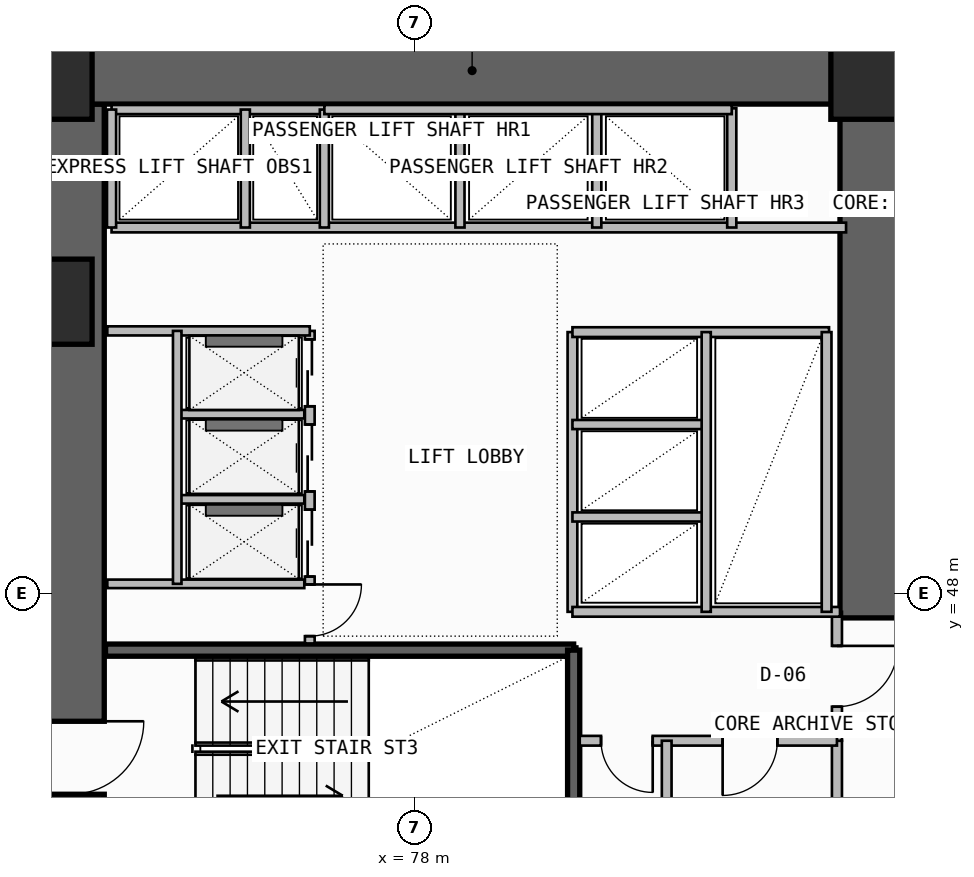
"""IFC4 building model, lengths in metres.
Left out: names, types, materials, properties, quantities, classifications, styles, units other than length and angle.
Written with IfcOpenShell. Run it as: python <this file> out.ifc"""

import sys

from ifc_helpers import new_model, si_unit, direction, frame, frame_2d, origin, origin_2d, place, context, subcontext, project, spatial, rectangle, extrude, element, fill, save


model = new_model("IFC4")
c1 = context("Model", 3, precision=1e-05, world=origin(), true_north=direction((0.0, 1.0)))
c2 = subcontext(c1, "Body", "Model", "MODEL_VIEW")
j1 = project(units=[si_unit("LENGTHUNIT", "METRE"), si_unit("PLANEANGLEUNIT", "RADIAN")], contexts=[c1])
p1 = place(None, origin())
s1 = spatial("IfcSite", under=j1, at=p1, CompositionType="ELEMENT")
p2 = place(p1, origin())
s2 = spatial("IfcBuilding", under=s1, at=p2, CompositionType="ELEMENT")
p3 = place(p2, frame((0.0, 0.0, 51.9)))
s3 = spatial("IfcBuildingStorey", under=s2, at=p3, CompositionType="ELEMENT", Elevation=51.9)
p4 = place(p3, frame((72.35, 43.35, -0.2), z_axis=(0.0, 0.0, 1.0), x_axis=(0.0, 1.0, 0.0)))
e1 = element("IfcWall", 1, at=p4, inside=s3, PredefinedType="SHEAR", context=c2, shape_type="SweptSolid", body=[
    extrude(rectangle(XDim=12.7, YDim=1.1, at=frame_2d((6.35, 0.0))), origin(), (0.0, 0.0, 1.0), 3.6),
])
p5 = place(p4, frame((1.35, 0.0, 0.2)))
e2 = element("IfcOpeningElement", 2, at=p5, cuts=e1, PredefinedType="OPENING", context=c2, shape_type="SweptSolid", body=[
    extrude(rectangle(XDim=1.2, YDim=2.2, at=frame_2d((0.6, 1.1))), frame((0.0, 0.56, 0.0), z_axis=(0.0, -1.0, 0.0), x_axis=(1.0, 0.0, 0.0)), (0.0, 0.0, 1.0), 1.12),
])
p6 = place(p3, frame((71.8, 56.6, -0.2), z_axis=(0.0, 0.0, 1.0), x_axis=(1.0, 0.0, 0.0)))
e3 = element("IfcWall", 3, at=p6, inside=s3, PredefinedType="SHEAR", context=c2, shape_type="SweptSolid", body=[
    extrude(rectangle(XDim=14.3, YDim=1.1, at=frame_2d((7.15, 0.0))), origin(), (0.0, 0.0, 1.0), 3.6),
])
p7 = place(p3, frame((85.55, 47.6, -0.2), z_axis=(0.0, 0.0, 1.0), x_axis=(0.0, 1.0, 0.0)))
e4 = element("IfcWall", 4, at=p7, inside=s3, PredefinedType="SHEAR", context=c2, shape_type="SweptSolid", body=[
    extrude(rectangle(XDim=8.45, YDim=1.1, at=frame_2d((4.225, 0.0))), origin(), (0.0, 0.0, 1.0), 3.6),
])
for number, where, z_axis, x_axis in (
    (5, (72.0, 52.8, 0.0), (0.0, 0.0, 1.0), (1.0, 0.0, 0.0)),
    (6, (72.0, 56.5, 0.0), (0.0, 0.0, 1.0), (1.0, 0.0, 0.0)),
    (7, (85.55, 56.5, 0.0), (0.0, 0.0, 1.0), (1.0, 0.0, 0.0)),
):
    element("IfcColumn", number, at=place(p3, frame(where, z_axis=z_axis, x_axis=x_axis)), inside=s3, PredefinedType="COLUMN", context=c2, shape_type="SweptSolid", body=[
        extrude(rectangle(XDim=1.4, YDim=1.4, at=origin_2d()), origin(), (0.0, 0.0, 1.0), 3.6),
    ])
p8 = place(p3, frame((72.92, 47.07, -0.2), z_axis=(0.0, 0.0, 1.0), x_axis=(1.0, 0.0, 0.0)))
e8 = element("IfcWall", 8, at=p8, inside=s3, PredefinedType="SOLIDWALL", context=c2, shape_type="SweptSolid", body=[
    extrude(rectangle(XDim=7.7, YDim=0.2, at=frame_2d((3.85, 0.0))), origin(), (0.0, 0.0, 1.0), 3.6),
])
p9 = place(p3, frame((80.62, 43.83, -0.2), z_axis=(0.0, 0.0, 1.0), x_axis=(0.0, 1.0, 0.0)))
e9 = element("IfcWall", 9, at=p9, inside=s3, PredefinedType="SOLIDWALL", context=c2, shape_type="SweptSolid", body=[
    extrude(rectangle(XDim=3.24, YDim=0.2, at=frame_2d((1.62, 0.0))), origin(), (0.0, 0.0, 1.0), 3.6),
])
p10 = place(p3, frame((84.95, 43.68, 0.0), z_axis=(0.0, 0.0, 1.0), x_axis=(0.0, 1.0, 0.0)))
e10 = element("IfcWall", 10, at=p10, inside=s3, PredefinedType="PLUMBINGWALL", context=c2, shape_type="SweptSolid", body=[
    extrude(rectangle(XDim=1.9, YDim=0.165, at=frame_2d((0.95, 0.0))), origin(), (0.0, 0.0, 1.0), 3.4),
])
p11 = place(p3, frame((84.95, 45.58, 0.0), z_axis=(0.0, 0.0, 1.0), x_axis=(0.0, 1.0, 0.0)))
e11 = element("IfcWall", 11, at=p11, inside=s3, PredefinedType="PARTITIONING", context=c2, shape_type="SweptSolid", body=[
    extrude(rectangle(XDim=2.12, YDim=0.165, at=frame_2d((1.06, 0.0))), origin(), (0.0, 0.0, 1.0), 3.4),
])
p12 = place(p11, frame((0.56, 0.0, 0.0)))
e12 = element("IfcOpeningElement", 12, at=p12, cuts=e11, PredefinedType="OPENING", context=c2, shape_type="SweptSolid", body=[
    extrude(rectangle(XDim=1.0, YDim=2.2, at=frame_2d((0.5, 1.1))), frame((0.0, 0.093, 0.0), z_axis=(0.0, -1.0, 0.0), x_axis=(1.0, 0.0, 0.0)), (0.0, 0.0, 1.0), 0.185),
])
p13 = place(p3, frame((80.72, 45.58, 0.0), z_axis=(0.0, 0.0, 1.0), x_axis=(1.0, 0.0, 0.0)))
e13 = element("IfcWall", 13, at=p13, inside=s3, PredefinedType="PLUMBINGWALL", context=c2, shape_type="SweptSolid", body=[
    extrude(rectangle(XDim=4.23, YDim=0.16, at=frame_2d((2.115, 0.0))), origin(), (0.0, 0.0, 1.0), 3.4),
])
p14 = place(p13, frame((0.35, 0.0, 0.0)))
e14 = element("IfcOpeningElement", 14, at=p14, cuts=e13, PredefinedType="OPENING", context=c2, shape_type="SweptSolid", body=[
    extrude(rectangle(XDim=0.85, YDim=2.05, at=frame_2d((0.425, 1.025))), frame((0.0, 0.09, 0.0), z_axis=(0.0, -1.0, 0.0), x_axis=(1.0, 0.0, 0.0)), (0.0, 0.0, 1.0), 0.18),
])
p15 = place(p13, frame((2.35, 0.0, 0.0)))
e15 = element("IfcOpeningElement", 15, at=p15, cuts=e13, PredefinedType="OPENING", context=c2, shape_type="SweptSolid", body=[
    extrude(rectangle(XDim=0.9, YDim=2.1, at=frame_2d((0.45, 1.05))), frame((0.0, 0.09, 0.0), z_axis=(0.0, -1.0, 0.0), x_axis=(1.0, 0.0, 0.0)), (0.0, 0.0, 1.0), 0.18),
])
p16 = place(p3, frame((82.15, 43.68, 0.0), z_axis=(0.0, 0.0, 1.0), x_axis=(0.0, 1.0, 0.0)))
e16 = element("IfcWall", 16, at=p16, inside=s3, PredefinedType="PLUMBINGWALL", context=c2, shape_type="SweptSolid", body=[
    extrude(rectangle(XDim=1.9, YDim=0.16, at=frame_2d((0.95, 0.0))), origin(), (0.0, 0.0, 1.0), 3.4),
])
p17 = place(p3, frame((76.28, 47.18, 0.0), z_axis=(0.0, 0.0, 1.0), x_axis=(0.0, 1.0, 0.0)))
e17 = element("IfcWall", 17, at=p17, inside=s3, PredefinedType="SOLIDWALL", context=c2, shape_type="SweptSolid", body=[
    extrude(rectangle(XDim=5.14, YDim=0.16, at=frame_2d((2.57, 0.0))), origin(), (0.0, 0.0, 1.0), 3.4),
])
p18 = place(p17, frame((1.1, 0.0, 0.0)))
e18 = element("IfcOpeningElement", 18, at=p18, cuts=e17, PredefinedType="OPENING", context=c2, shape_type="SweptSolid", body=[
    extrude(rectangle(XDim=1.1, YDim=2.25, at=frame_2d((0.55, 1.125))), frame((0.0, 0.09, 0.0), z_axis=(0.0, -1.0, 0.0), x_axis=(1.0, 0.0, 0.0)), (0.0, 0.0, 1.0), 0.18),
])
p19 = place(p17, frame((2.5, 0.0, 0.0)))
e19 = element("IfcOpeningElement", 19, at=p19, cuts=e17, PredefinedType="OPENING", context=c2, shape_type="SweptSolid", body=[
    extrude(rectangle(XDim=1.1, YDim=2.25, at=frame_2d((0.55, 1.125))), frame((0.0, 0.09, 0.0), z_axis=(0.0, -1.0, 0.0), x_axis=(1.0, 0.0, 0.0)), (0.0, 0.0, 1.0), 0.18),
])
p20 = place(p17, frame((3.9, 0.0, 0.0)))
e20 = element("IfcOpeningElement", 20, at=p20, cuts=e17, PredefinedType="OPENING", context=c2, shape_type="SweptSolid", body=[
    extrude(rectangle(XDim=1.1, YDim=2.25, at=frame_2d((0.55, 1.125))), frame((0.0, 0.09, 0.0), z_axis=(0.0, -1.0, 0.0), x_axis=(1.0, 0.0, 0.0)), (0.0, 0.0, 1.0), 0.18),
])
p21 = place(p17, frame((0.12, 0.0, 0.0)))
e21 = element("IfcOpeningElement", 21, at=p21, cuts=e17, PredefinedType="OPENING", context=c2, shape_type="SweptSolid", body=[
    extrude(rectangle(XDim=0.85, YDim=2.05, at=frame_2d((0.425, 1.025))), frame((0.0, 0.09, 0.0), z_axis=(0.0, -1.0, 0.0), x_axis=(1.0, 0.0, 0.0)), (0.0, 0.0, 1.0), 0.18),
])
p22 = place(p3, frame((72.95, 52.32, 0.0), z_axis=(0.0, 0.0, 1.0), x_axis=(1.0, 0.0, 0.0)))
e22 = element("IfcWall", 22, at=p22, inside=s3, PredefinedType="SOLIDWALL", context=c2, shape_type="SweptSolid", body=[
    extrude(rectangle(XDim=3.33, YDim=0.15, at=frame_2d((1.665, 0.0))), origin(), (0.0, 0.0, 1.0), 3.4),
])
p23 = place(p3, frame((72.95, 48.16, 0.0), z_axis=(0.0, 0.0, 1.0), x_axis=(1.0, 0.0, 0.0)))
e23 = element("IfcWall", 23, at=p23, inside=s3, PredefinedType="PLUMBINGWALL", context=c2, shape_type="SweptSolid", body=[
    extrude(rectangle(XDim=3.24, YDim=0.14, at=frame_2d((1.62, 0.0))), origin(), (0.0, 0.0, 1.0), 3.4),
])
for number, where, z_axis, x_axis in (
    (24, (74.15, 49.55, 0.0), (0.0, 0.0, 1.0), (1.0, 0.0, 0.0)),
    (25, (74.15, 50.95, 0.0), (0.0, 0.0, 1.0), (1.0, 0.0, 0.0)),
):
    element("IfcWall", number, at=place(p3, frame(where, z_axis=z_axis, x_axis=x_axis)), inside=s3, PredefinedType="PLUMBINGWALL", context=c2, shape_type="SweptSolid", body=[
        extrude(rectangle(XDim=2.04, YDim=0.14, at=frame_2d((1.02, 0.0))), origin(), (0.0, 0.0, 1.0), 3.4),
    ])
p24 = place(p3, frame((74.1, 48.16, 0.0), z_axis=(0.0, 0.0, 1.0), x_axis=(0.0, 1.0, 0.0)))
e26 = element("IfcWall", 26, at=p24, inside=s3, PredefinedType="PLUMBINGWALL", context=c2, shape_type="SweptSolid", body=[
    extrude(rectangle(XDim=4.16, YDim=0.14, at=frame_2d((2.08, 0.0))), origin(), (0.0, 0.0, 1.0), 3.4),
])
p25 = place(p3, frame((80.6, 47.7, 0.0), z_axis=(0.0, 0.0, 1.0), x_axis=(0.0, 1.0, 0.0)))
e27 = element("IfcWall", 27, at=p25, inside=s3, PredefinedType="SOLIDWALL", context=c2, shape_type="SweptSolid", body=[
    extrude(rectangle(XDim=4.6, YDim=0.16, at=frame_2d((2.3, 0.0))), origin(), (0.0, 0.0, 1.0), 3.4),
])
p26 = place(p3, frame((80.6, 47.7, 0.0), z_axis=(0.0, 0.0, 1.0), x_axis=(1.0, 0.0, 0.0)))
e28 = element("IfcWall", 28, at=p26, inside=s3, PredefinedType="SOLIDWALL", context=c2, shape_type="SweptSolid", body=[
    extrude(rectangle(XDim=4.4, YDim=0.16, at=frame_2d((2.2, 0.0))), origin(), (0.0, 0.0, 1.0), 3.4),
])
p27 = place(p3, frame((80.6, 52.3, 0.0), z_axis=(0.0, 0.0, 1.0), x_axis=(1.0, 0.0, 0.0)))
e29 = element("IfcWall", 29, at=p27, inside=s3, PredefinedType="SOLIDWALL", context=c2, shape_type="SweptSolid", body=[
    extrude(rectangle(XDim=4.22, YDim=0.16, at=frame_2d((2.11, 0.0))), origin(), (0.0, 0.0, 1.0), 3.4),
])
for number, where, z_axis, x_axis in (
    (30, (80.6, 49.26, 0.0), (0.0, 0.0, 1.0), (1.0, 0.0, 0.0)),
    (31, (80.6, 50.78, 0.0), (0.0, 0.0, 1.0), (1.0, 0.0, 0.0)),
):
    element("IfcWall", number, at=place(p3, frame(where, z_axis=z_axis, x_axis=x_axis)), inside=s3, PredefinedType="PLUMBINGWALL", context=c2, shape_type="SweptSolid", body=[
        extrude(rectangle(XDim=2.2, YDim=0.15, at=frame_2d((1.1, 0.0))), origin(), (0.0, 0.0, 1.0), 3.4),
    ])
p28 = place(p3, frame((82.8, 47.7, 0.0), z_axis=(0.0, 0.0, 1.0), x_axis=(0.0, 1.0, 0.0)))
e32 = element("IfcWall", 32, at=p28, inside=s3, PredefinedType="PLUMBINGWALL", context=c2, shape_type="SweptSolid", body=[
    extrude(rectangle(XDim=4.6, YDim=0.15, at=frame_2d((2.3, 0.0))), origin(), (0.0, 0.0, 1.0), 3.4),
])
p29 = place(p3, frame((84.78, 47.7, 0.0), z_axis=(0.0, 0.0, 1.0), x_axis=(0.0, 1.0, 0.0)))
e33 = element("IfcWall", 33, at=p29, inside=s3, PredefinedType="SOLIDWALL", context=c2, shape_type="SweptSolid", body=[
    extrude(rectangle(XDim=4.6, YDim=0.16, at=frame_2d((2.3, 0.0))), origin(), (0.0, 0.0, 1.0), 3.4),
])
p30 = place(p3, frame((73.02, 54.02, 0.0), z_axis=(0.0, 0.0, 1.0), x_axis=(1.0, 0.0, 0.0)))
e34 = element("IfcWall", 34, at=p30, inside=s3, PredefinedType="SOLIDWALL", context=c2, shape_type="SweptSolid", body=[
    extrude(rectangle(XDim=12.08, YDim=0.16, at=frame_2d((6.04, 0.0))), origin(), (0.0, 0.0, 1.0), 3.4),
])
p31 = place(p3, frame((73.02, 55.96, 0.0), z_axis=(0.0, 0.0, 1.0), x_axis=(1.0, 0.0, 0.0)))
e35 = element("IfcWall", 35, at=p31, inside=s3, PredefinedType="SOLIDWALL", context=c2, shape_type="SweptSolid", body=[
    extrude(rectangle(XDim=3.5, YDim=0.15, at=frame_2d((1.75, 0.0))), origin(), (0.0, 0.0, 1.0), 3.4),
])
p32 = place(p3, frame((73.02, 54.02, 0.0), z_axis=(0.0, 0.0, 1.0), x_axis=(0.0, 1.0, 0.0)))
e36 = element("IfcWall", 36, at=p32, inside=s3, PredefinedType="PLUMBINGWALL", context=c2, shape_type="SweptSolid", body=[
    extrude(rectangle(XDim=1.94, YDim=0.15, at=frame_2d((0.97, 0.0))), origin(), (0.0, 0.0, 1.0), 3.4),
])
p33 = place(p3, frame((76.52, 54.02, 0.0), z_axis=(0.0, 0.0, 1.0), x_axis=(0.0, 1.0, 0.0)))
e37 = element("IfcWall", 37, at=p33, inside=s3, PredefinedType="SOLIDWALL", context=c2, shape_type="SweptSolid", body=[
    extrude(rectangle(XDim=1.94, YDim=0.15, at=frame_2d((0.97, 0.0))), origin(), (0.0, 0.0, 1.0), 3.4),
])
p34 = place(p3, frame((75.22, 54.02, 0.0), z_axis=(0.0, 0.0, 1.0), x_axis=(0.0, 1.0, 0.0)))
e38 = element("IfcWall", 38, at=p34, inside=s3, PredefinedType="PLUMBINGWALL", context=c2, shape_type="SweptSolid", body=[
    extrude(rectangle(XDim=1.94, YDim=0.15, at=frame_2d((0.97, 0.0))), origin(), (0.0, 0.0, 1.0), 3.4),
])
for number, where, z_axis, x_axis in (
    (39, (78.75, 54.02, 0.0), (0.0, 0.0, 1.0), (0.0, 1.0, 0.0)),
    (40, (81.0, 54.02, 0.0), (0.0, 0.0, 1.0), (0.0, 1.0, 0.0)),
):
    element("IfcWall", number, at=place(p3, frame(where, z_axis=z_axis, x_axis=x_axis)), inside=s3, PredefinedType="PLUMBINGWALL", context=c2, shape_type="SweptSolid", body=[
        extrude(rectangle(XDim=1.96, YDim=0.15, at=frame_2d((0.98, 0.0))), origin(), (0.0, 0.0, 1.0), 3.4),
    ])
p35 = place(p3, frame((83.22, 54.02, 0.0), z_axis=(0.0, 0.0, 1.0), x_axis=(0.0, 1.0, 0.0)))
e41 = element("IfcWall", 41, at=p35, inside=s3, PredefinedType="SOLIDWALL", context=c2, shape_type="SweptSolid", body=[
    extrude(rectangle(XDim=1.96, YDim=0.15, at=frame_2d((0.98, 0.0))), origin(), (0.0, 0.0, 1.0), 3.4),
])
p36 = place(p3, frame((76.52, 55.96, 0.0), z_axis=(0.0, 0.0, 1.0), x_axis=(1.0, 0.0, 0.0)))
e42 = element("IfcWall", 42, at=p36, inside=s3, PredefinedType="SOLIDWALL", context=c2, shape_type="SweptSolid", body=[
    extrude(rectangle(XDim=6.7, YDim=0.15, at=frame_2d((3.35, 0.0))), origin(), (0.0, 0.0, 1.0), 3.4),
])
p37 = place(p5, frame((1.2, 0.0, 0.0), z_axis=(0.0, 0.0, 1.0), x_axis=(-1.0, 0.0, 0.0)))
e43 = element("IfcDoor", 43, at=p37, inside=s3, OperationType="SINGLE_SWING_LEFT", PredefinedType="USERDEFINED", context=c2, shape_type="SweptSolid", body=[
    extrude(rectangle(XDim=1.2, YDim=2.2, at=frame_2d((0.6, 1.1))), frame((0.0, 0.025, 0.0), z_axis=(0.0, -1.0, 0.0), x_axis=(1.0, 0.0, 0.0)), (0.0, 0.0, 1.0), 0.05),
])
fill(e2, e43)
p38 = place(p12, frame((1.0, 0.0, 0.0), z_axis=(0.0, 0.0, 1.0), x_axis=(-1.0, 0.0, 0.0)))
e44 = element("IfcDoor", 44, at=p38, inside=s3, OperationType="SINGLE_SWING_LEFT", PredefinedType="DOOR", context=c2, shape_type="SweptSolid", body=[
    extrude(rectangle(XDim=1.0, YDim=2.2, at=frame_2d((0.5, 1.1))), frame((0.0, 0.025, 0.0), z_axis=(0.0, -1.0, 0.0), x_axis=(1.0, 0.0, 0.0)), (0.0, 0.0, 1.0), 0.05),
])
fill(e12, e44)
p39 = place(p14, frame((0.85, 0.0, 0.0), z_axis=(0.0, 0.0, 1.0), x_axis=(-1.0, 0.0, 0.0)))
e45 = element("IfcDoor", 45, at=p39, inside=s3, OperationType="SINGLE_SWING_LEFT", PredefinedType="DOOR", context=c2, shape_type="SweptSolid", body=[
    extrude(rectangle(XDim=0.85, YDim=2.05, at=frame_2d((0.425, 1.025))), frame((0.0, 0.025, 0.0), z_axis=(0.0, -1.0, 0.0), x_axis=(1.0, 0.0, 0.0)), (0.0, 0.0, 1.0), 0.05),
])
fill(e14, e45)
p40 = place(p15, frame((0.9, 0.0, 0.0), z_axis=(0.0, 0.0, 1.0), x_axis=(-1.0, 0.0, 0.0)))
e46 = element("IfcDoor", 46, at=p40, inside=s3, OperationType="SINGLE_SWING_RIGHT", PredefinedType="DOOR", context=c2, shape_type="SweptSolid", body=[
    extrude(rectangle(XDim=0.9, YDim=2.1, at=frame_2d((0.45, 1.05))), frame((0.0, 0.025, 0.0), z_axis=(0.0, -1.0, 0.0), x_axis=(1.0, 0.0, 0.0)), (0.0, 0.0, 1.0), 0.05),
])
fill(e15, e46)
p41 = place(p18, origin())
e47 = element("IfcDoor", 47, at=p41, inside=s3, OperationType="DOUBLE_DOOR_SLIDING", PredefinedType="DOOR", context=c2, shape_type="SweptSolid", body=[
    extrude(rectangle(XDim=1.1, YDim=2.25, at=frame_2d((0.55, 1.125))), frame((0.0, 0.025, 0.0), z_axis=(0.0, -1.0, 0.0), x_axis=(1.0, 0.0, 0.0)), (0.0, 0.0, 1.0), 0.05),
])
fill(e18, e47)
p42 = place(p19, origin())
e48 = element("IfcDoor", 48, at=p42, inside=s3, OperationType="DOUBLE_DOOR_SLIDING", PredefinedType="DOOR", context=c2, shape_type="SweptSolid", body=[
    extrude(rectangle(XDim=1.1, YDim=2.25, at=frame_2d((0.55, 1.125))), frame((0.0, 0.025, 0.0), z_axis=(0.0, -1.0, 0.0), x_axis=(1.0, 0.0, 0.0)), (0.0, 0.0, 1.0), 0.05),
])
fill(e19, e48)
p43 = place(p20, origin())
e49 = element("IfcDoor", 49, at=p43, inside=s3, OperationType="DOUBLE_DOOR_SLIDING", PredefinedType="DOOR", context=c2, shape_type="SweptSolid", body=[
    extrude(rectangle(XDim=1.1, YDim=2.25, at=frame_2d((0.55, 1.125))), frame((0.0, 0.025, 0.0), z_axis=(0.0, -1.0, 0.0), x_axis=(1.0, 0.0, 0.0)), (0.0, 0.0, 1.0), 0.05),
])
fill(e20, e49)
p44 = place(p21, frame((0.85, 0.0, 0.0), z_axis=(0.0, 0.0, 1.0), x_axis=(-1.0, 0.0, 0.0)))
e50 = element("IfcDoor", 50, at=p44, inside=s3, OperationType="SINGLE_SWING_LEFT", PredefinedType="DOOR", context=c2, shape_type="SweptSolid", body=[
    extrude(rectangle(XDim=0.85, YDim=2.05, at=frame_2d((0.425, 1.025))), frame((0.0, 0.025, 0.0), z_axis=(0.0, -1.0, 0.0), x_axis=(1.0, 0.0, 0.0)), (0.0, 0.0, 1.0), 0.05),
])
fill(e21, e50)
save(model, sys.argv[1])
